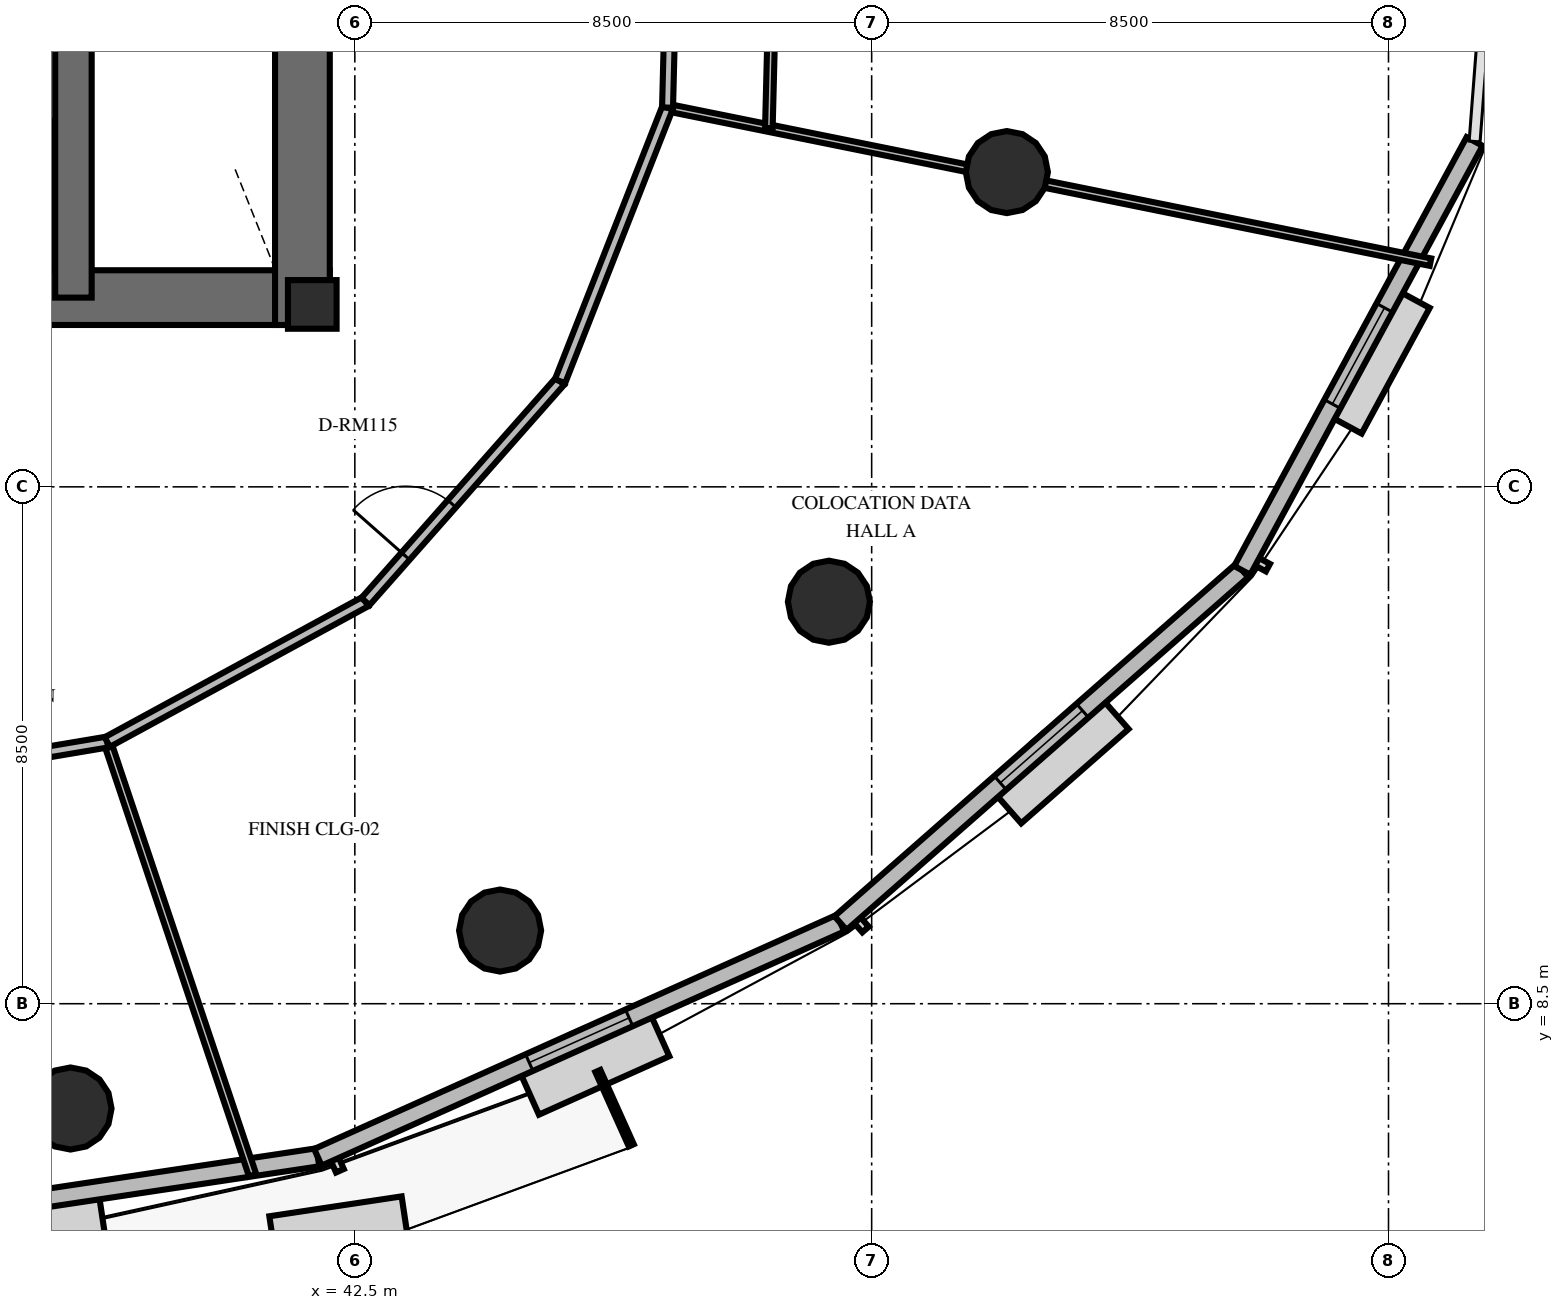
"""IFC4 building model, lengths in metres.
Left out: names, types, materials, properties, quantities, classifications, styles, units other than length and angle.
Written with IfcOpenShell. Run it as: python <this file> out.ifc"""

import sys

from ifc_helpers import new_model, si_unit, direction, frame, frame_2d, origin, origin_2d, place, context, subcontext, project, spatial, rectangle, circle, extrude, element, fill, save


model = new_model("IFC4")
c1 = context("Model", 3, precision=1e-05, world=origin(), true_north=direction((0.0, 1.0)))
c2 = subcontext(c1, "Body", "Model", "MODEL_VIEW")
j1 = project(units=[si_unit("LENGTHUNIT", "METRE"), si_unit("PLANEANGLEUNIT", "RADIAN")], contexts=[c1])
p1 = place(None, origin())
s1 = spatial("IfcSite", under=j1, at=p1, CompositionType="ELEMENT")
p2 = place(p1, origin())
s2 = spatial("IfcBuilding", under=s1, at=p2, CompositionType="ELEMENT")
p3 = place(p2, frame((0.0, 0.0, 67.8)))
s3 = spatial("IfcBuildingStorey", under=s2, at=p3, CompositionType="ELEMENT", Elevation=67.8)
p4 = place(p3, frame((25.922, 20.112, 0.0), z_axis=(0.0, 0.0, 1.0), x_axis=(1.0, 0.0, 0.0)))
e1 = element("IfcWall", 1, at=p4, inside=s3, PredefinedType="SHEAR", context=c2, shape_type="SweptSolid", body=[
    extrude(rectangle(XDim=16.166, YDim=0.9, at=frame_2d((8.083, 0.0))), origin(), (0.0, 0.0, 1.0), 4.2),
])
p5 = place(p3, frame((41.638, 19.662, 0.0), z_axis=(0.0, 0.0, 1.0), x_axis=(0.0, 1.0, 0.0)))
e2 = element("IfcWall", 2, at=p5, inside=s3, PredefinedType="SHEAR", context=c2, shape_type="SweptSolid", body=[
    extrude(rectangle(XDim=10.876, YDim=0.9, at=frame_2d((5.438, 0.0))), origin(), (0.0, 0.0, 1.0), 4.2),
])
p6 = place(p3, frame((37.872, 20.112, 0.0), z_axis=(0.0, 0.0, 1.0), x_axis=(0.0, 1.0, 0.0)))
e3 = element("IfcWall", 3, at=p6, inside=s3, PredefinedType="SHEAR", context=c2, shape_type="SweptSolid", body=[
    extrude(rectangle(XDim=9.976, YDim=0.6, at=frame_2d((4.988, 0.0))), origin(), (0.0, 0.0, 1.0), 4.2),
])
p7 = place(p3, frame((41.8, 20.0, 0.0), z_axis=(0.0, 0.0, 1.0), x_axis=(1.0, 0.0, 0.0)))
e4 = element("IfcColumn", 4, at=p7, inside=s3, PredefinedType="PILASTER", context=c2, shape_type="SweptSolid", body=[
    extrude(rectangle(XDim=0.8, YDim=0.8, at=origin_2d()), origin(), (0.0, 0.0, 1.0), 4.2),
])
for number, where, z_axis, x_axis in (
    (5, (37.824, 6.777, 0.0), (0.0, 0.0, 1.0), (1.0, 0.0, 0.0)),
    (6, (44.889, 9.703, 0.0), (0.0, 0.0, 1.0), (1.0, 0.0, 0.0)),
    (7, (50.297, 15.111, 0.0), (0.0, 0.0, 1.0), (1.0, 0.0, 0.0)),
    (8, (53.223, 22.176, 0.0), (0.0, 0.0, 1.0), (1.0, 0.0, 0.0)),
):
    element("IfcColumn", number, at=place(p3, frame(where, z_axis=z_axis, x_axis=x_axis)), inside=s3, PredefinedType="COLUMN", context=c2, shape_type="SweptSolid", body=[
        extrude(circle(Radius=0.675, at=origin_2d()), origin(), (0.0, 0.0, 1.0), 4.2),
    ])
p8 = place(p3, frame((32.345, 4.539, 0.0), z_axis=(0.0, 0.0, 1.0), x_axis=(0.988888262402, 0.148660702551, 0.0)))
e9 = element("IfcWall", 9, at=p8, inside=s3, PredefinedType="SOLIDWALL", context=c2, shape_type="SweptSolid", body=[
    extrude(rectangle(XDim=9.655, YDim=0.3, at=frame_2d((4.827, 0.0))), origin(), (0.0, 0.0, 1.0), 3.0),
])
p9 = place(p8, frame((1.15, 0.0, 0.0)))
e10 = element("IfcOpeningElement", 10, at=p9, cuts=e9, PredefinedType="OPENING", context=c2, shape_type="SweptSolid", body=[
    extrude(rectangle(XDim=1.05, YDim=2.15, at=frame_2d((0.525, 1.075))), frame((0.0, 0.16, 0.0), z_axis=(0.0, -1.0, 0.0), x_axis=(1.0, 0.0, 0.0)), (0.0, 0.0, 1.0), 0.32),
])
p10 = place(p3, frame((41.892, 5.974, 0.0), z_axis=(0.0, 0.0, 1.0), x_axis=(0.912605050972, 0.408842293484, 0.0)))
e11 = element("IfcWall", 11, at=p10, inside=s3, PredefinedType="SOLIDWALL", context=c2, shape_type="SweptSolid", body=[
    extrude(rectangle(XDim=9.419, YDim=0.3, at=frame_2d((4.709, 0.0))), origin(), (0.0, 0.0, 1.0), 3.0),
])
p11 = place(p10, frame((3.809, 0.0, 0.8)))
e12 = element("IfcOpeningElement", 12, at=p11, cuts=e11, PredefinedType="OPENING", context=c2, shape_type="SweptSolid", body=[
    extrude(rectangle(XDim=1.8, YDim=1.95, at=frame_2d((0.9, 0.975))), frame((0.0, 0.16, 0.0), z_axis=(0.0, -1.0, 0.0), x_axis=(1.0, 0.0, 0.0)), (0.0, 0.0, 1.0), 0.32),
])
p12 = place(p3, frame((50.488, 9.825, 0.0), z_axis=(0.0, 0.0, 1.0), x_axis=(0.751409333496, 0.659836353603, 0.0)))
e13 = element("IfcWall", 13, at=p12, inside=s3, PredefinedType="SOLIDWALL", context=c2, shape_type="SweptSolid", body=[
    extrude(rectangle(XDim=8.793, YDim=0.3, at=frame_2d((4.396, 0.0))), origin(), (0.0, 0.0, 1.0), 3.0),
])
p13 = place(p12, frame((3.496, 0.0, 0.8)))
e14 = element("IfcOpeningElement", 14, at=p13, cuts=e13, PredefinedType="OPENING", context=c2, shape_type="SweptSolid", body=[
    extrude(rectangle(XDim=1.8, YDim=1.95, at=frame_2d((0.9, 0.975))), frame((0.0, 0.16, 0.0), z_axis=(0.0, -1.0, 0.0), x_axis=(1.0, 0.0, 0.0)), (0.0, 0.0, 1.0), 0.32),
])
p14 = place(p3, frame((57.095, 15.627, 0.0), z_axis=(0.0, 0.0, 1.0), x_axis=(0.476385116332, 0.879236726336, 0.0)))
e15 = element("IfcWall", 15, at=p14, inside=s3, PredefinedType="SOLIDWALL", context=c2, shape_type="SweptSolid", body=[
    extrude(rectangle(XDim=8.021, YDim=0.3, at=frame_2d((4.011, 0.0))), origin(), (0.0, 0.0, 1.0), 3.0),
])
p15 = place(p14, frame((3.111, 0.0, 0.8)))
e16 = element("IfcOpeningElement", 16, at=p15, cuts=e15, PredefinedType="OPENING", context=c2, shape_type="SweptSolid", body=[
    extrude(rectangle(XDim=1.8, YDim=1.95, at=frame_2d((0.9, 0.975))), frame((0.0, 0.16, 0.0), z_axis=(0.0, -1.0, 0.0), x_axis=(1.0, 0.0, 0.0)), (0.0, 0.0, 1.0), 0.32),
])
p16 = place(p3, frame((34.75, 22.92, 0.0), z_axis=(0.0, 0.0, 1.0), x_axis=(1.0, 0.0, 0.0)))
e17 = element("IfcWall", 17, at=p16, inside=s3, PredefinedType="SOLIDWALL", context=c2, shape_type="SweptSolid", body=[
    extrude(rectangle(XDim=2.81, YDim=0.2, at=frame_2d((1.405, 0.0))), origin(), (0.0, 0.0, 1.0), 3.0),
])
p17 = place(p16, frame((0.19, 0.0, 0.0)))
e18 = element("IfcOpeningElement", 18, at=p17, cuts=e17, PredefinedType="OPENING", context=c2, shape_type="SweptSolid", body=[
    extrude(rectangle(XDim=1.05, YDim=2.1, at=frame_2d((0.525, 1.05))), frame((0.0, 0.11, 0.0), z_axis=(0.0, -1.0, 0.0), x_axis=(1.0, 0.0, 0.0)), (0.0, 0.0, 1.0), 0.22),
])
p18 = place(p16, frame((1.57, 0.0, 0.0)))
e19 = element("IfcOpeningElement", 19, at=p18, cuts=e17, PredefinedType="OPENING", context=c2, shape_type="SweptSolid", body=[
    extrude(rectangle(XDim=1.05, YDim=2.1, at=frame_2d((0.525, 1.05))), frame((0.0, 0.11, 0.0), z_axis=(0.0, -1.0, 0.0), x_axis=(1.0, 0.0, 0.0)), (0.0, 0.0, 1.0), 0.22),
])
p19 = place(p3, frame((38.428, 12.803, 0.0), z_axis=(0.0, 0.0, 1.0), x_axis=(0.318127905721, -0.948047802382, 0.0)))
e20 = element("IfcWall", 20, at=p19, inside=s3, PredefinedType="PARTITIONING", context=c2, shape_type="SweptSolid", body=[
    extrude(rectangle(XDim=7.514, YDim=0.125, at=frame_2d((3.757, 0.0))), origin(), (0.0, 0.0, 1.0), 3.0),
])
p20 = place(p3, frame((34.134, 12.081, 0.0), z_axis=(0.0, 0.0, 1.0), x_axis=(0.986138216839, 0.165925939168, 0.0)))
e21 = element("IfcWall", 21, at=p20, inside=s3, PredefinedType="PARTITIONING", context=c2, shape_type="SweptSolid", body=[
    extrude(rectangle(XDim=4.355, YDim=0.18, at=frame_2d((2.178, 0.0))), origin(), (0.0, 0.0, 1.0), 3.0),
])
p21 = place(p3, frame((47.643, 23.237, 0.0), z_axis=(0.0, 0.0, 1.0), x_axis=(0.980096567328, -0.19852133062, 0.0)))
e22 = element("IfcWall", 22, at=p21, inside=s3, PredefinedType="PARTITIONING", context=c2, shape_type="SweptSolid", body=[
    extrude(rectangle(XDim=12.802, YDim=0.125, at=frame_2d((6.401, 0.0))), origin(), (0.0, 0.0, 1.0), 3.0),
])
p22 = place(p3, frame((38.428, 12.803, 0.0), z_axis=(0.0, 0.0, 1.0), x_axis=(0.878385338365, 0.477953133001, 0.0)))
e23 = element("IfcWall", 23, at=p22, inside=s3, PredefinedType="PARTITIONING", context=c2, shape_type="SweptSolid", body=[
    extrude(rectangle(XDim=4.834, YDim=0.18, at=frame_2d((2.417, 0.0))), origin(), (0.0, 0.0, 1.0), 3.0),
])
p23 = place(p3, frame((42.675, 15.114, 0.0), z_axis=(0.0, 0.0, 1.0), x_axis=(0.661965641577, 0.74953418159, 0.0)))
e24 = element("IfcWall", 24, at=p23, inside=s3, PredefinedType="PARTITIONING", context=c2, shape_type="SweptSolid", body=[
    extrude(rectangle(XDim=4.834, YDim=0.18, at=frame_2d((2.417, 0.0))), origin(), (0.0, 0.0, 1.0), 3.0),
])
p24 = place(p23, frame((0.996, 0.0, 0.0)))
e25 = element("IfcOpeningElement", 25, at=p24, cuts=e24, PredefinedType="OPENING", context=c2, shape_type="SweptSolid", body=[
    extrude(rectangle(XDim=1.15, YDim=2.15, at=frame_2d((0.575, 1.075))), frame((0.0, 0.1, 0.0), z_axis=(0.0, -1.0, 0.0), x_axis=(1.0, 0.0, 0.0)), (0.0, 0.0, 1.0), 0.2),
])
p25 = place(p3, frame((45.875, 18.737, 0.0), z_axis=(0.0, 0.0, 1.0), x_axis=(0.365724243793, 0.930723255056, 0.0)))
e26 = element("IfcWall", 26, at=p25, inside=s3, PredefinedType="PARTITIONING", context=c2, shape_type="SweptSolid", body=[
    extrude(rectangle(XDim=4.834, YDim=0.18, at=frame_2d((2.417, 0.0))), origin(), (0.0, 0.0, 1.0), 3.0),
])
p26 = place(p3, frame((47.643, 23.237, 0.0), z_axis=(0.0, 0.0, 1.0), x_axis=(0.025301319276, 0.99967987038, 0.0)))
e27 = element("IfcWall", 27, at=p26, inside=s3, PredefinedType="PARTITIONING", context=c2, shape_type="SweptSolid", body=[
    extrude(rectangle(XDim=4.834, YDim=0.18, at=frame_2d((2.417, 0.0))), origin(), (0.0, 0.0, 1.0), 3.0),
])
p27 = place(p3, frame((49.309, 22.899, 0.0), z_axis=(0.0, 0.0, 1.0), x_axis=(0.025292405975, 0.999680095931, 0.0)))
e28 = element("IfcWall", 28, at=p27, inside=s3, PredefinedType="PARTITIONING", context=c2, shape_type="SweptSolid", body=[
    extrude(rectangle(XDim=5.425, YDim=0.125, at=frame_2d((2.712, 0.0))), origin(), (0.0, 0.0, 1.0), 3.0),
])
p28 = place(p11, origin())
e29 = element("IfcWindow", 29, at=p28, inside=s3, PartitioningType="SINGLE_PANEL", PredefinedType="WINDOW", context=c2, shape_type="SweptSolid", body=[
    extrude(rectangle(XDim=1.8, YDim=1.95, at=frame_2d((0.9, 0.975))), frame((0.0, 0.03, 0.0), z_axis=(0.0, -1.0, 0.0), x_axis=(1.0, 0.0, 0.0)), (0.0, 0.0, 1.0), 0.06),
])
fill(e12, e29)
p29 = place(p13, origin())
e30 = element("IfcWindow", 30, at=p29, inside=s3, PartitioningType="SINGLE_PANEL", PredefinedType="WINDOW", context=c2, shape_type="SweptSolid", body=[
    extrude(rectangle(XDim=1.8, YDim=1.95, at=frame_2d((0.9, 0.975))), frame((0.0, 0.03, 0.0), z_axis=(0.0, -1.0, 0.0), x_axis=(1.0, 0.0, 0.0)), (0.0, 0.0, 1.0), 0.06),
])
fill(e14, e30)
p30 = place(p15, origin())
e31 = element("IfcWindow", 31, at=p30, inside=s3, PartitioningType="SINGLE_PANEL", PredefinedType="WINDOW", context=c2, shape_type="SweptSolid", body=[
    extrude(rectangle(XDim=1.8, YDim=1.95, at=frame_2d((0.9, 0.975))), frame((0.0, 0.03, 0.0), z_axis=(0.0, -1.0, 0.0), x_axis=(1.0, 0.0, 0.0)), (0.0, 0.0, 1.0), 0.06),
])
fill(e16, e31)
p31 = place(p24, origin())
e32 = element("IfcDoor", 32, at=p31, inside=s3, OperationType="SINGLE_SWING_LEFT", PredefinedType="DOOR", context=c2, shape_type="SweptSolid", body=[
    extrude(rectangle(XDim=1.15, YDim=2.15, at=frame_2d((0.575, 1.075))), frame((0.0, 0.025, 0.0), z_axis=(0.0, -1.0, 0.0), x_axis=(1.0, 0.0, 0.0)), (0.0, 0.0, 1.0), 0.05),
])
fill(e25, e32)
save(model, sys.argv[1])
